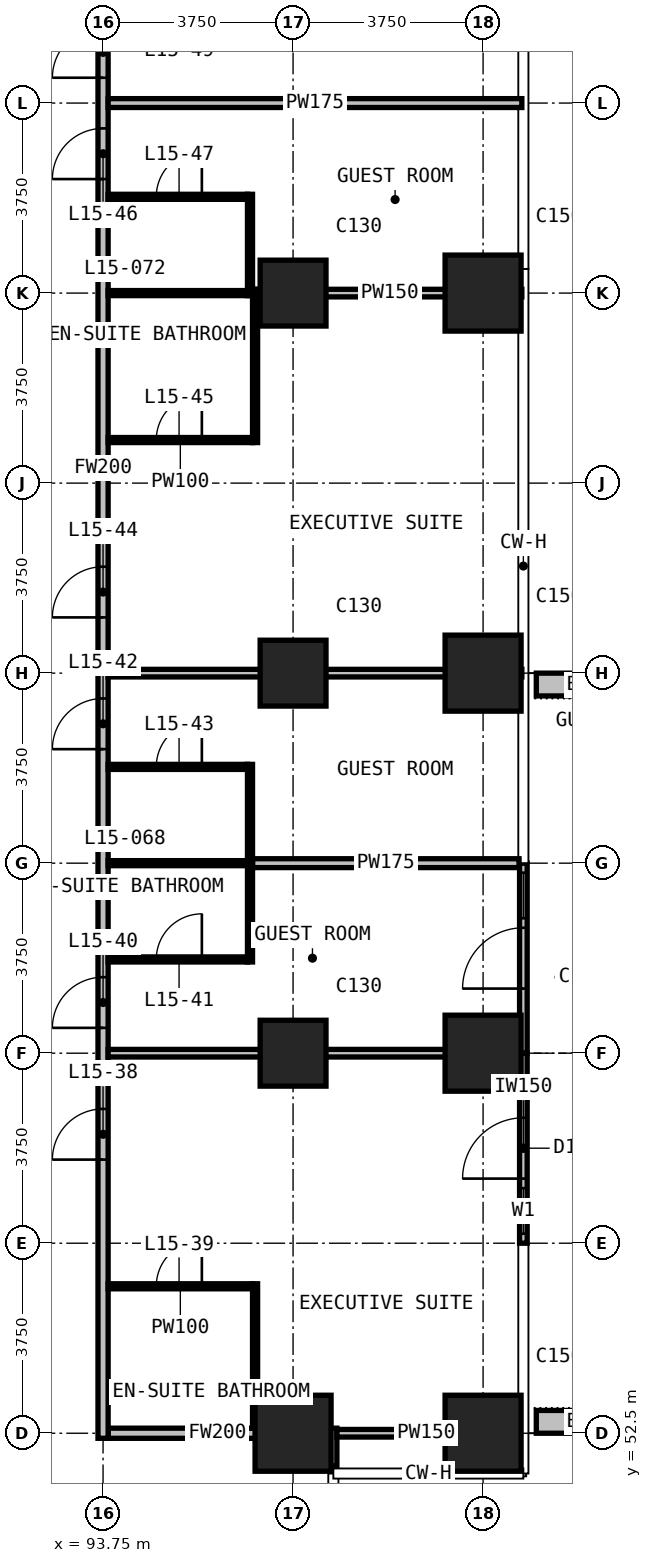
"""IFC4 building model, lengths in metres.
Left out: names, types, materials, properties, quantities, classifications, styles, units other than length and angle.
Written with IfcOpenShell. Run it as: python <this file> out.ifc"""

import sys

from ifc_helpers import new_model, si_unit, direction, frame, frame_2d, origin, origin_2d, place, context, subcontext, project, spatial, rectangle, extrude, element, fill, save


model = new_model("IFC4")
c1 = context("Model", 3, precision=1e-05, world=origin(), true_north=direction((0.0, 1.0)))
c2 = subcontext(c1, "Body", "Model", "MODEL_VIEW")
j1 = project(units=[si_unit("LENGTHUNIT", "METRE"), si_unit("PLANEANGLEUNIT", "RADIAN")], contexts=[c1])
p1 = place(None, origin())
s1 = spatial("IfcSite", under=j1, at=p1, CompositionType="ELEMENT")
p2 = place(p1, origin())
s2 = spatial("IfcBuilding", under=s1, at=p2, CompositionType="ELEMENT")
p3 = place(p2, frame((0.0, 0.0, 69.2)))
s3 = spatial("IfcBuildingStorey", under=s2, at=p3, CompositionType="ELEMENT", Elevation=69.2)
p4 = place(p3, frame((97.5, 52.5, 0.0), z_axis=(0.0, 0.0, 1.0), x_axis=(1.0, 0.0, 0.0)))
e1 = element("IfcColumn", 1, at=p4, inside=s3, PredefinedType="COLUMN", context=c2, shape_type="SweptSolid", body=[
    extrude(rectangle(XDim=1.5, YDim=1.5, at=origin_2d()), origin(), (0.0, 0.0, 1.0), 3.3),
])
for number, where, z_axis, x_axis in (
    (2, (97.5, 60.0, 0.0), (0.0, 0.0, 1.0), (1.0, 0.0, 0.0)),
    (3, (97.5, 67.5, 0.0), (0.0, 0.0, 1.0), (1.0, 0.0, 0.0)),
    (4, (97.5, 75.0, 0.0), (0.0, 0.0, 1.0), (1.0, 0.0, 0.0)),
):
    element("IfcColumn", number, at=place(p3, frame(where, z_axis=z_axis, x_axis=x_axis)), inside=s3, PredefinedType="COLUMN", context=c2, shape_type="SweptSolid", body=[
        extrude(rectangle(XDim=1.3, YDim=1.3, at=origin_2d()), origin(), (0.0, 0.0, 1.0), 3.3),
    ])
for number, where, z_axis, x_axis in (
    (5, (101.25, 52.5, 0.0), (0.0, 0.0, 1.0), (1.0, 0.0, 0.0)),
    (6, (101.25, 60.0, 0.0), (0.0, 0.0, 1.0), (1.0, 0.0, 0.0)),
    (7, (101.25, 67.5, 0.0), (0.0, 0.0, 1.0), (1.0, 0.0, 0.0)),
    (8, (101.25, 75.0, 0.0), (0.0, 0.0, 1.0), (1.0, 0.0, 0.0)),
):
    element("IfcColumn", number, at=place(p3, frame(where, z_axis=z_axis, x_axis=x_axis)), inside=s3, PredefinedType="COLUMN", context=c2, shape_type="SweptSolid", body=[
        extrude(rectangle(XDim=1.5, YDim=1.5, at=origin_2d()), origin(), (0.0, 0.0, 1.0), 3.3),
    ])
p5 = place(p3, frame((102.045, 56.25, 0.0), z_axis=(0.0, 0.0, 1.0), x_axis=(0.0, 1.0, 0.0)))
e9 = element("IfcWall", 9, at=p5, inside=s3, PredefinedType="SOLIDWALL", context=c2, shape_type="SweptSolid", body=[
    extrude(rectangle(XDim=3.75, YDim=0.15, at=frame_2d((1.875, 0.0))), origin(), (0.0, 0.0, 1.0), 3.0),
])
p6 = place(p5, frame((0.188, 0.0, 0.1)))
e10 = element("IfcOpeningElement", 10, at=p6, cuts=e9, PredefinedType="OPENING", context=c2, shape_type="SweptSolid", body=[
    extrude(rectangle(XDim=0.9, YDim=2.4, at=frame_2d((0.45, 1.2))), frame((0.0, 0.085, 0.0), z_axis=(0.0, -1.0, 0.0), x_axis=(1.0, 0.0, 0.0)), (0.0, 0.0, 1.0), 0.17),
])
p7 = place(p5, frame((1.275, 0.0, 0.0)))
e11 = element("IfcOpeningElement", 11, at=p7, cuts=e9, PredefinedType="OPENING", context=c2, shape_type="SweptSolid", body=[
    extrude(rectangle(XDim=1.2, YDim=2.4, at=frame_2d((0.6, 1.2))), frame((0.0, 0.085, 0.0), z_axis=(0.0, -1.0, 0.0), x_axis=(1.0, 0.0, 0.0)), (0.0, 0.0, 1.0), 0.17),
])
p8 = place(p3, frame((102.045, 60.0, 0.0), z_axis=(0.0, 0.0, 1.0), x_axis=(0.0, 1.0, 0.0)))
e12 = element("IfcWall", 12, at=p8, inside=s3, PredefinedType="SOLIDWALL", context=c2, shape_type="SweptSolid", body=[
    extrude(rectangle(XDim=3.75, YDim=0.15, at=frame_2d((1.875, 0.0))), origin(), (0.0, 0.0, 1.0), 3.0),
])
p9 = place(p8, frame((1.275, 0.0, 0.0)))
e13 = element("IfcOpeningElement", 13, at=p9, cuts=e12, PredefinedType="OPENING", context=c2, shape_type="SweptSolid", body=[
    extrude(rectangle(XDim=1.2, YDim=2.4, at=frame_2d((0.6, 1.2))), frame((0.0, 0.085, 0.0), z_axis=(0.0, -1.0, 0.0), x_axis=(1.0, 0.0, 0.0)), (0.0, 0.0, 1.0), 0.17),
])
p10 = place(p8, frame((2.663, 0.0, 0.1)))
e14 = element("IfcOpeningElement", 14, at=p10, cuts=e12, PredefinedType="OPENING", context=c2, shape_type="SweptSolid", body=[
    extrude(rectangle(XDim=0.9, YDim=2.4, at=frame_2d((0.45, 1.2))), frame((0.0, 0.085, 0.0), z_axis=(0.0, -1.0, 0.0), x_axis=(1.0, 0.0, 0.0)), (0.0, 0.0, 1.0), 0.17),
])
for number, where, z_axis, x_axis in (
    (15, (102.3, 52.725, 0.0), (0.0, 0.0, 1.0), (1.0, 0.0, 0.0)),
    (16, (102.3, 67.275, 0.0), (0.0, 0.0, 1.0), (1.0, 0.0, 0.0)),
):
    element("IfcWall", number, at=place(p3, frame(where, z_axis=z_axis, x_axis=x_axis)), inside=s3, PredefinedType="USERDEFINED", context=c2, shape_type="SweptSolid", body=[
        extrude(rectangle(XDim=2.35, YDim=0.45, at=frame_2d((1.175, 0.0))), origin(), (0.0, 0.0, 1.0), 1.1),
    ])
p11 = place(p3, frame((93.85, 52.5, 0.0), z_axis=(0.0, 0.0, 1.0), x_axis=(1.0, 0.0, 0.0)))
e17 = element("IfcWall", 17, at=p11, inside=s3, PredefinedType="PARTITIONING", context=c2, shape_type="SweptSolid", body=[
    extrude(rectangle(XDim=4.315, YDim=0.2, at=frame_2d((2.157, 0.0))), origin(), (0.0, 0.0, 1.0), 3.0),
])
p12 = place(p3, frame((93.75, 52.4, 0.0), z_axis=(0.0, 0.0, 1.0), x_axis=(0.0, 1.0, 0.0)))
e18 = element("IfcWall", 18, at=p12, inside=s3, PredefinedType="PARTITIONING", context=c2, shape_type="SweptSolid", body=[
    extrude(rectangle(XDim=38.31, YDim=0.2, at=frame_2d((19.155, 0.0))), origin(), (0.0, 0.0, 1.0), 3.0),
])
p13 = place(p12, frame((5.5, 0.0, 0.0)))
e19 = element("IfcOpeningElement", 19, at=p13, cuts=e18, PredefinedType="OPENING", context=c2, shape_type="SweptSolid", body=[
    extrude(rectangle(XDim=1.0, YDim=2.2, at=frame_2d((0.5, 1.1))), frame((0.0, 0.11, 0.0), z_axis=(0.0, -1.0, 0.0), x_axis=(1.0, 0.0, 0.0)), (0.0, 0.0, 1.0), 0.22),
])
p14 = place(p12, frame((8.1, 0.0, 0.0)))
e20 = element("IfcOpeningElement", 20, at=p14, cuts=e18, PredefinedType="OPENING", context=c2, shape_type="SweptSolid", body=[
    extrude(rectangle(XDim=1.0, YDim=2.2, at=frame_2d((0.5, 1.1))), frame((0.0, 0.11, 0.0), z_axis=(0.0, -1.0, 0.0), x_axis=(1.0, 0.0, 0.0)), (0.0, 0.0, 1.0), 0.22),
])
p15 = place(p12, frame((13.6, 0.0, 0.0)))
e21 = element("IfcOpeningElement", 21, at=p15, cuts=e18, PredefinedType="OPENING", context=c2, shape_type="SweptSolid", body=[
    extrude(rectangle(XDim=1.0, YDim=2.2, at=frame_2d((0.5, 1.1))), frame((0.0, 0.11, 0.0), z_axis=(0.0, -1.0, 0.0), x_axis=(1.0, 0.0, 0.0)), (0.0, 0.0, 1.0), 0.22),
])
p16 = place(p12, frame((16.2, 0.0, 0.0)))
e22 = element("IfcOpeningElement", 22, at=p16, cuts=e18, PredefinedType="OPENING", context=c2, shape_type="SweptSolid", body=[
    extrude(rectangle(XDim=1.0, YDim=2.2, at=frame_2d((0.5, 1.1))), frame((0.0, 0.11, 0.0), z_axis=(0.0, -1.0, 0.0), x_axis=(1.0, 0.0, 0.0)), (0.0, 0.0, 1.0), 0.22),
])
p17 = place(p12, frame((24.85, 0.0, 0.0)))
e23 = element("IfcOpeningElement", 23, at=p17, cuts=e18, PredefinedType="OPENING", context=c2, shape_type="SweptSolid", body=[
    extrude(rectangle(XDim=1.0, YDim=2.2, at=frame_2d((0.5, 1.1))), frame((0.0, 0.11, 0.0), z_axis=(0.0, -1.0, 0.0), x_axis=(1.0, 0.0, 0.0)), (0.0, 0.0, 1.0), 0.22),
])
p18 = place(p12, frame((26.85, 0.0, 0.0)))
e24 = element("IfcOpeningElement", 24, at=p18, cuts=e18, PredefinedType="OPENING", context=c2, shape_type="SweptSolid", body=[
    extrude(rectangle(XDim=1.0, YDim=2.2, at=frame_2d((0.5, 1.1))), frame((0.0, 0.11, 0.0), z_axis=(0.0, -1.0, 0.0), x_axis=(1.0, 0.0, 0.0)), (0.0, 0.0, 1.0), 0.22),
])
p19 = place(p12, frame((31.55, 0.0, 0.0)))
e25 = element("IfcOpeningElement", 25, at=p19, cuts=e18, PredefinedType="OPENING", context=c2, shape_type="SweptSolid", body=[
    extrude(rectangle(XDim=0.9, YDim=2.2, at=frame_2d((0.45, 1.1))), frame((0.0, 0.11, 0.0), z_axis=(0.0, -1.0, 0.0), x_axis=(1.0, 0.0, 0.0)), (0.0, 0.0, 1.0), 0.22),
])
p20 = place(p12, frame((35.65, 0.0, 0.0)))
e26 = element("IfcOpeningElement", 26, at=p20, cuts=e18, PredefinedType="OPENING", context=c2, shape_type="SweptSolid", body=[
    extrude(rectangle(XDim=0.9, YDim=2.2, at=frame_2d((0.45, 1.1))), frame((0.0, 0.11, 0.0), z_axis=(0.0, -1.0, 0.0), x_axis=(1.0, 0.0, 0.0)), (0.0, 0.0, 1.0), 0.22),
])
p21 = place(p3, frame((98.265, 51.855, 0.0), z_axis=(0.0, 0.0, 1.0), x_axis=(0.0, 1.0, 0.0)))
e27 = element("IfcWall", 27, at=p21, inside=s3, PredefinedType="PARTITIONING", context=c2, shape_type="SweptSolid", body=[
    extrude(rectangle(XDim=0.745, YDim=0.2, at=frame_2d((0.373, 0.0))), origin(), (0.0, 0.0, 1.0), 3.0),
])
p22 = place(p3, frame((96.7, 63.75, 0.0), z_axis=(0.0, 0.0, 1.0), x_axis=(1.0, 0.0, 0.0)))
e28 = element("IfcWall", 28, at=p22, inside=s3, PredefinedType="PARTITIONING", context=c2, shape_type="SweptSolid", body=[
    extrude(rectangle(XDim=5.26, YDim=0.175, at=frame_2d((2.63, 0.0))), origin(), (0.0, 0.0, 1.0), 3.0),
])
p23 = place(p3, frame((93.85, 78.75, 0.0), z_axis=(0.0, 0.0, 1.0), x_axis=(1.0, 0.0, 0.0)))
e29 = element("IfcWall", 29, at=p23, inside=s3, PredefinedType="PARTITIONING", context=c2, shape_type="SweptSolid", body=[
    extrude(rectangle(XDim=8.165, YDim=0.175, at=frame_2d((4.083, 0.0))), origin(), (0.0, 0.0, 1.0), 3.0),
])
p24 = place(p3, frame((98.365, 52.5, 0.0), z_axis=(0.0, 0.0, 1.0), x_axis=(1.0, 0.0, 0.0)))
e30 = element("IfcWall", 30, at=p24, inside=s3, PredefinedType="PARTITIONING", context=c2, shape_type="SweptSolid", body=[
    extrude(rectangle(XDim=3.53, YDim=0.15, at=frame_2d((1.765, 0.0))), origin(), (0.0, 0.0, 1.0), 3.0),
])
p25 = place(p3, frame((93.85, 60.0, 0.0), z_axis=(0.0, 0.0, 1.0), x_axis=(1.0, 0.0, 0.0)))
e31 = element("IfcWall", 31, at=p25, inside=s3, PredefinedType="PARTITIONING", context=c2, shape_type="SweptSolid", body=[
    extrude(rectangle(XDim=8.11, YDim=0.15, at=frame_2d((4.055, 0.0))), origin(), (0.0, 0.0, 1.0), 3.0),
])
p26 = place(p3, frame((93.85, 67.5, 0.0), z_axis=(0.0, 0.0, 1.0), x_axis=(1.0, 0.0, 0.0)))
e32 = element("IfcWall", 32, at=p26, inside=s3, PredefinedType="PARTITIONING", context=c2, shape_type="SweptSolid", body=[
    extrude(rectangle(XDim=8.165, YDim=0.15, at=frame_2d((4.083, 0.0))), origin(), (0.0, 0.0, 1.0), 3.0),
])
p27 = place(p3, frame((96.8, 75.0, 0.0), z_axis=(0.0, 0.0, 1.0), x_axis=(1.0, 0.0, 0.0)))
e33 = element("IfcWall", 33, at=p27, inside=s3, PredefinedType="PARTITIONING", context=c2, shape_type="SweptSolid", body=[
    extrude(rectangle(XDim=5.215, YDim=0.15, at=frame_2d((2.607, 0.0))), origin(), (0.0, 0.0, 1.0), 3.0),
])
p28 = place(p3, frame((93.85, 55.4, 0.0), z_axis=(0.0, 0.0, 1.0), x_axis=(1.0, 0.0, 0.0)))
e34 = element("IfcWall", 34, at=p28, inside=s3, PredefinedType="PARTITIONING", context=c2, shape_type="SweptSolid", body=[
    extrude(rectangle(XDim=2.85, YDim=0.1, at=frame_2d((1.425, 0.0))), origin(), (0.0, 0.0, 1.0), 3.0),
])
p29 = place(p28, frame((0.95, 0.0, 0.0)))
e35 = element("IfcOpeningElement", 35, at=p29, cuts=e34, PredefinedType="OPENING", context=c2, shape_type="SweptSolid", body=[
    extrude(rectangle(XDim=0.9, YDim=2.2, at=frame_2d((0.45, 1.1))), frame((0.0, 0.06, 0.0), z_axis=(0.0, -1.0, 0.0), x_axis=(1.0, 0.0, 0.0)), (0.0, 0.0, 1.0), 0.12),
])
p30 = place(p3, frame((93.85, 61.85, 0.0), z_axis=(0.0, 0.0, 1.0), x_axis=(1.0, 0.0, 0.0)))
e36 = element("IfcWall", 36, at=p30, inside=s3, PredefinedType="PARTITIONING", context=c2, shape_type="SweptSolid", body=[
    extrude(rectangle(XDim=2.75, YDim=0.1, at=frame_2d((1.375, 0.0))), origin(), (0.0, 0.0, 1.0), 3.0),
])
p31 = place(p30, frame((0.95, 0.0, 0.0)))
e37 = element("IfcOpeningElement", 37, at=p31, cuts=e36, PredefinedType="OPENING", context=c2, shape_type="SweptSolid", body=[
    extrude(rectangle(XDim=0.9, YDim=2.2, at=frame_2d((0.45, 1.1))), frame((0.0, 0.06, 0.0), z_axis=(0.0, -1.0, 0.0), x_axis=(1.0, 0.0, 0.0)), (0.0, 0.0, 1.0), 0.12),
])
p32 = place(p3, frame((93.85, 63.75, 0.0), z_axis=(0.0, 0.0, 1.0), x_axis=(1.0, 0.0, 0.0)))
e38 = element("IfcWall", 38, at=p32, inside=s3, PredefinedType="PARTITIONING", context=c2, shape_type="SweptSolid", body=[
    extrude(rectangle(XDim=2.75, YDim=0.1, at=frame_2d((1.375, 0.0))), origin(), (0.0, 0.0, 1.0), 3.0),
])
p33 = place(p3, frame((93.85, 65.65, 0.0), z_axis=(0.0, 0.0, 1.0), x_axis=(1.0, 0.0, 0.0)))
e39 = element("IfcWall", 39, at=p33, inside=s3, PredefinedType="PARTITIONING", context=c2, shape_type="SweptSolid", body=[
    extrude(rectangle(XDim=2.75, YDim=0.1, at=frame_2d((1.375, 0.0))), origin(), (0.0, 0.0, 1.0), 3.0),
])
p34 = place(p33, frame((0.95, 0.0, 0.0)))
e40 = element("IfcOpeningElement", 40, at=p34, cuts=e39, PredefinedType="OPENING", context=c2, shape_type="SweptSolid", body=[
    extrude(rectangle(XDim=0.9, YDim=2.2, at=frame_2d((0.45, 1.1))), frame((0.0, 0.06, 0.0), z_axis=(0.0, -1.0, 0.0), x_axis=(1.0, 0.0, 0.0)), (0.0, 0.0, 1.0), 0.12),
])
p35 = place(p3, frame((93.85, 72.1, 0.0), z_axis=(0.0, 0.0, 1.0), x_axis=(1.0, 0.0, 0.0)))
e41 = element("IfcWall", 41, at=p35, inside=s3, PredefinedType="PARTITIONING", context=c2, shape_type="SweptSolid", body=[
    extrude(rectangle(XDim=2.85, YDim=0.1, at=frame_2d((1.425, 0.0))), origin(), (0.0, 0.0, 1.0), 3.0),
])
p36 = place(p35, frame((0.95, 0.0, 0.0)))
e42 = element("IfcOpeningElement", 42, at=p36, cuts=e41, PredefinedType="OPENING", context=c2, shape_type="SweptSolid", body=[
    extrude(rectangle(XDim=0.9, YDim=2.2, at=frame_2d((0.45, 1.1))), frame((0.0, 0.06, 0.0), z_axis=(0.0, -1.0, 0.0), x_axis=(1.0, 0.0, 0.0)), (0.0, 0.0, 1.0), 0.12),
])
p37 = place(p3, frame((93.85, 75.0, 0.0), z_axis=(0.0, 0.0, 1.0), x_axis=(1.0, 0.0, 0.0)))
e43 = element("IfcWall", 43, at=p37, inside=s3, PredefinedType="PARTITIONING", context=c2, shape_type="SweptSolid", body=[
    extrude(rectangle(XDim=2.75, YDim=0.1, at=frame_2d((1.375, 0.0))), origin(), (0.0, 0.0, 1.0), 3.0),
])
p38 = place(p3, frame((93.85, 76.9, 0.0), z_axis=(0.0, 0.0, 1.0), x_axis=(1.0, 0.0, 0.0)))
e44 = element("IfcWall", 44, at=p38, inside=s3, PredefinedType="PARTITIONING", context=c2, shape_type="SweptSolid", body=[
    extrude(rectangle(XDim=2.75, YDim=0.1, at=frame_2d((1.375, 0.0))), origin(), (0.0, 0.0, 1.0), 3.0),
])
p39 = place(p38, frame((0.95, 0.0, 0.0)))
e45 = element("IfcOpeningElement", 45, at=p39, cuts=e44, PredefinedType="OPENING", context=c2, shape_type="SweptSolid", body=[
    extrude(rectangle(XDim=0.9, YDim=2.2, at=frame_2d((0.45, 1.1))), frame((0.0, 0.06, 0.0), z_axis=(0.0, -1.0, 0.0), x_axis=(1.0, 0.0, 0.0)), (0.0, 0.0, 1.0), 0.12),
])
p40 = place(p3, frame((96.65, 61.8, 0.0), z_axis=(0.0, 0.0, 1.0), x_axis=(0.0, 1.0, 0.0)))
e46 = element("IfcWall", 46, at=p40, inside=s3, PredefinedType="PARTITIONING", context=c2, shape_type="SweptSolid", body=[
    extrude(rectangle(XDim=3.9, YDim=0.1, at=frame_2d((1.95, 0.0))), origin(), (0.0, 0.0, 1.0), 3.0),
])
p41 = place(p3, frame((96.65, 74.95, 0.0), z_axis=(0.0, 0.0, 1.0), x_axis=(0.0, 1.0, 0.0)))
e47 = element("IfcWall", 47, at=p41, inside=s3, PredefinedType="PARTITIONING", context=c2, shape_type="SweptSolid", body=[
    extrude(rectangle(XDim=2.0, YDim=0.1, at=frame_2d((1.0, 0.0))), origin(), (0.0, 0.0, 1.0), 3.0),
])
p42 = place(p3, frame((96.75, 52.6, 0.0), z_axis=(0.0, 0.0, 1.0), x_axis=(0.0, 1.0, 0.0)))
e48 = element("IfcWall", 48, at=p42, inside=s3, PredefinedType="PARTITIONING", context=c2, shape_type="SweptSolid", body=[
    extrude(rectangle(XDim=2.85, YDim=0.1, at=frame_2d((1.425, 0.0))), origin(), (0.0, 0.0, 1.0), 3.0),
])
p43 = place(p3, frame((96.75, 72.05, 0.0), z_axis=(0.0, 0.0, 1.0), x_axis=(0.0, 1.0, 0.0)))
e49 = element("IfcWall", 49, at=p43, inside=s3, PredefinedType="PARTITIONING", context=c2, shape_type="SweptSolid", body=[
    extrude(rectangle(XDim=3.025, YDim=0.1, at=frame_2d((1.512, 0.0))), origin(), (0.0, 0.0, 1.0), 3.0),
])
p44 = place(p6, origin())
e50 = element("IfcWindow", 50, at=p44, inside=s3, PartitioningType="SINGLE_PANEL", PredefinedType="WINDOW", context=c2, shape_type="SweptSolid", body=[
    extrude(rectangle(XDim=0.9, YDim=2.4, at=frame_2d((0.45, 1.2))), frame((0.0, 0.03, 0.0), z_axis=(0.0, -1.0, 0.0), x_axis=(1.0, 0.0, 0.0)), (0.0, 0.0, 1.0), 0.06),
])
fill(e10, e50)
p45 = place(p7, origin())
e51 = element("IfcDoor", 51, at=p45, inside=s3, OperationType="SINGLE_SWING_LEFT", PredefinedType="DOOR", context=c2, shape_type="SweptSolid", body=[
    extrude(rectangle(XDim=1.2, YDim=2.4, at=frame_2d((0.6, 1.2))), frame((0.0, 0.025, 0.0), z_axis=(0.0, -1.0, 0.0), x_axis=(1.0, 0.0, 0.0)), (0.0, 0.0, 1.0), 0.05),
])
fill(e11, e51)
p46 = place(p9, origin())
e52 = element("IfcDoor", 52, at=p46, inside=s3, OperationType="SINGLE_SWING_LEFT", PredefinedType="DOOR", context=c2, shape_type="SweptSolid", body=[
    extrude(rectangle(XDim=1.2, YDim=2.4, at=frame_2d((0.6, 1.2))), frame((0.0, 0.025, 0.0), z_axis=(0.0, -1.0, 0.0), x_axis=(1.0, 0.0, 0.0)), (0.0, 0.0, 1.0), 0.05),
])
fill(e13, e52)
p47 = place(p10, origin())
e53 = element("IfcWindow", 53, at=p47, inside=s3, PartitioningType="SINGLE_PANEL", PredefinedType="WINDOW", context=c2, shape_type="SweptSolid", body=[
    extrude(rectangle(XDim=0.9, YDim=2.4, at=frame_2d((0.45, 1.2))), frame((0.0, 0.03, 0.0), z_axis=(0.0, -1.0, 0.0), x_axis=(1.0, 0.0, 0.0)), (0.0, 0.0, 1.0), 0.06),
])
fill(e14, e53)
p48 = place(p13, origin())
e54 = element("IfcDoor", 54, at=p48, inside=s3, OperationType="SINGLE_SWING_RIGHT", PredefinedType="DOOR", context=c2, shape_type="SweptSolid", body=[
    extrude(rectangle(XDim=1.0, YDim=2.2, at=frame_2d((0.5, 1.1))), frame((0.0, 0.025, 0.0), z_axis=(0.0, -1.0, 0.0), x_axis=(1.0, 0.0, 0.0)), (0.0, 0.0, 1.0), 0.05),
])
fill(e19, e54)
p49 = place(p29, origin())
e55 = element("IfcDoor", 55, at=p49, inside=s3, OperationType="SINGLE_SWING_RIGHT", PredefinedType="DOOR", context=c2, shape_type="SweptSolid", body=[
    extrude(rectangle(XDim=0.9, YDim=2.2, at=frame_2d((0.45, 1.1))), frame((0.0, 0.025, 0.0), z_axis=(0.0, -1.0, 0.0), x_axis=(1.0, 0.0, 0.0)), (0.0, 0.0, 1.0), 0.05),
])
fill(e35, e55)
p50 = place(p14, origin())
e56 = element("IfcDoor", 56, at=p50, inside=s3, OperationType="SINGLE_SWING_LEFT", PredefinedType="DOOR", context=c2, shape_type="SweptSolid", body=[
    extrude(rectangle(XDim=1.0, YDim=2.2, at=frame_2d((0.5, 1.1))), frame((0.0, 0.025, 0.0), z_axis=(0.0, -1.0, 0.0), x_axis=(1.0, 0.0, 0.0)), (0.0, 0.0, 1.0), 0.05),
])
fill(e20, e56)
p51 = place(p31, origin())
e57 = element("IfcDoor", 57, at=p51, inside=s3, OperationType="SINGLE_SWING_RIGHT", PredefinedType="DOOR", context=c2, shape_type="SweptSolid", body=[
    extrude(rectangle(XDim=0.9, YDim=2.2, at=frame_2d((0.45, 1.1))), frame((0.0, 0.025, 0.0), z_axis=(0.0, -1.0, 0.0), x_axis=(1.0, 0.0, 0.0)), (0.0, 0.0, 1.0), 0.05),
])
fill(e37, e57)
p52 = place(p15, origin())
e58 = element("IfcDoor", 58, at=p52, inside=s3, OperationType="SINGLE_SWING_LEFT", PredefinedType="DOOR", context=c2, shape_type="SweptSolid", body=[
    extrude(rectangle(XDim=1.0, YDim=2.2, at=frame_2d((0.5, 1.1))), frame((0.0, 0.025, 0.0), z_axis=(0.0, -1.0, 0.0), x_axis=(1.0, 0.0, 0.0)), (0.0, 0.0, 1.0), 0.05),
])
fill(e21, e58)
p53 = place(p34, origin())
e59 = element("IfcDoor", 59, at=p53, inside=s3, OperationType="SINGLE_SWING_RIGHT", PredefinedType="DOOR", context=c2, shape_type="SweptSolid", body=[
    extrude(rectangle(XDim=0.9, YDim=2.2, at=frame_2d((0.45, 1.1))), frame((0.0, 0.025, 0.0), z_axis=(0.0, -1.0, 0.0), x_axis=(1.0, 0.0, 0.0)), (0.0, 0.0, 1.0), 0.05),
])
fill(e40, e59)
p54 = place(p16, origin())
e60 = element("IfcDoor", 60, at=p54, inside=s3, OperationType="SINGLE_SWING_LEFT", PredefinedType="DOOR", context=c2, shape_type="SweptSolid", body=[
    extrude(rectangle(XDim=1.0, YDim=2.2, at=frame_2d((0.5, 1.1))), frame((0.0, 0.025, 0.0), z_axis=(0.0, -1.0, 0.0), x_axis=(1.0, 0.0, 0.0)), (0.0, 0.0, 1.0), 0.05),
])
fill(e22, e60)
p55 = place(p36, origin())
e61 = element("IfcDoor", 61, at=p55, inside=s3, OperationType="SINGLE_SWING_RIGHT", PredefinedType="DOOR", context=c2, shape_type="SweptSolid", body=[
    extrude(rectangle(XDim=0.9, YDim=2.2, at=frame_2d((0.45, 1.1))), frame((0.0, 0.025, 0.0), z_axis=(0.0, -1.0, 0.0), x_axis=(1.0, 0.0, 0.0)), (0.0, 0.0, 1.0), 0.05),
])
fill(e42, e61)
p56 = place(p17, origin())
e62 = element("IfcDoor", 62, at=p56, inside=s3, OperationType="SINGLE_SWING_LEFT", PredefinedType="DOOR", context=c2, shape_type="SweptSolid", body=[
    extrude(rectangle(XDim=1.0, YDim=2.2, at=frame_2d((0.5, 1.1))), frame((0.0, 0.025, 0.0), z_axis=(0.0, -1.0, 0.0), x_axis=(1.0, 0.0, 0.0)), (0.0, 0.0, 1.0), 0.05),
])
fill(e23, e62)
p57 = place(p39, origin())
e63 = element("IfcDoor", 63, at=p57, inside=s3, OperationType="SINGLE_SWING_RIGHT", PredefinedType="DOOR", context=c2, shape_type="SweptSolid", body=[
    extrude(rectangle(XDim=0.9, YDim=2.2, at=frame_2d((0.45, 1.1))), frame((0.0, 0.025, 0.0), z_axis=(0.0, -1.0, 0.0), x_axis=(1.0, 0.0, 0.0)), (0.0, 0.0, 1.0), 0.05),
])
fill(e45, e63)
p58 = place(p18, origin())
e64 = element("IfcDoor", 64, at=p58, inside=s3, OperationType="SINGLE_SWING_LEFT", PredefinedType="DOOR", context=c2, shape_type="SweptSolid", body=[
    extrude(rectangle(XDim=1.0, YDim=2.2, at=frame_2d((0.5, 1.1))), frame((0.0, 0.025, 0.0), z_axis=(0.0, -1.0, 0.0), x_axis=(1.0, 0.0, 0.0)), (0.0, 0.0, 1.0), 0.05),
])
fill(e24, e64)
save(model, sys.argv[1])
